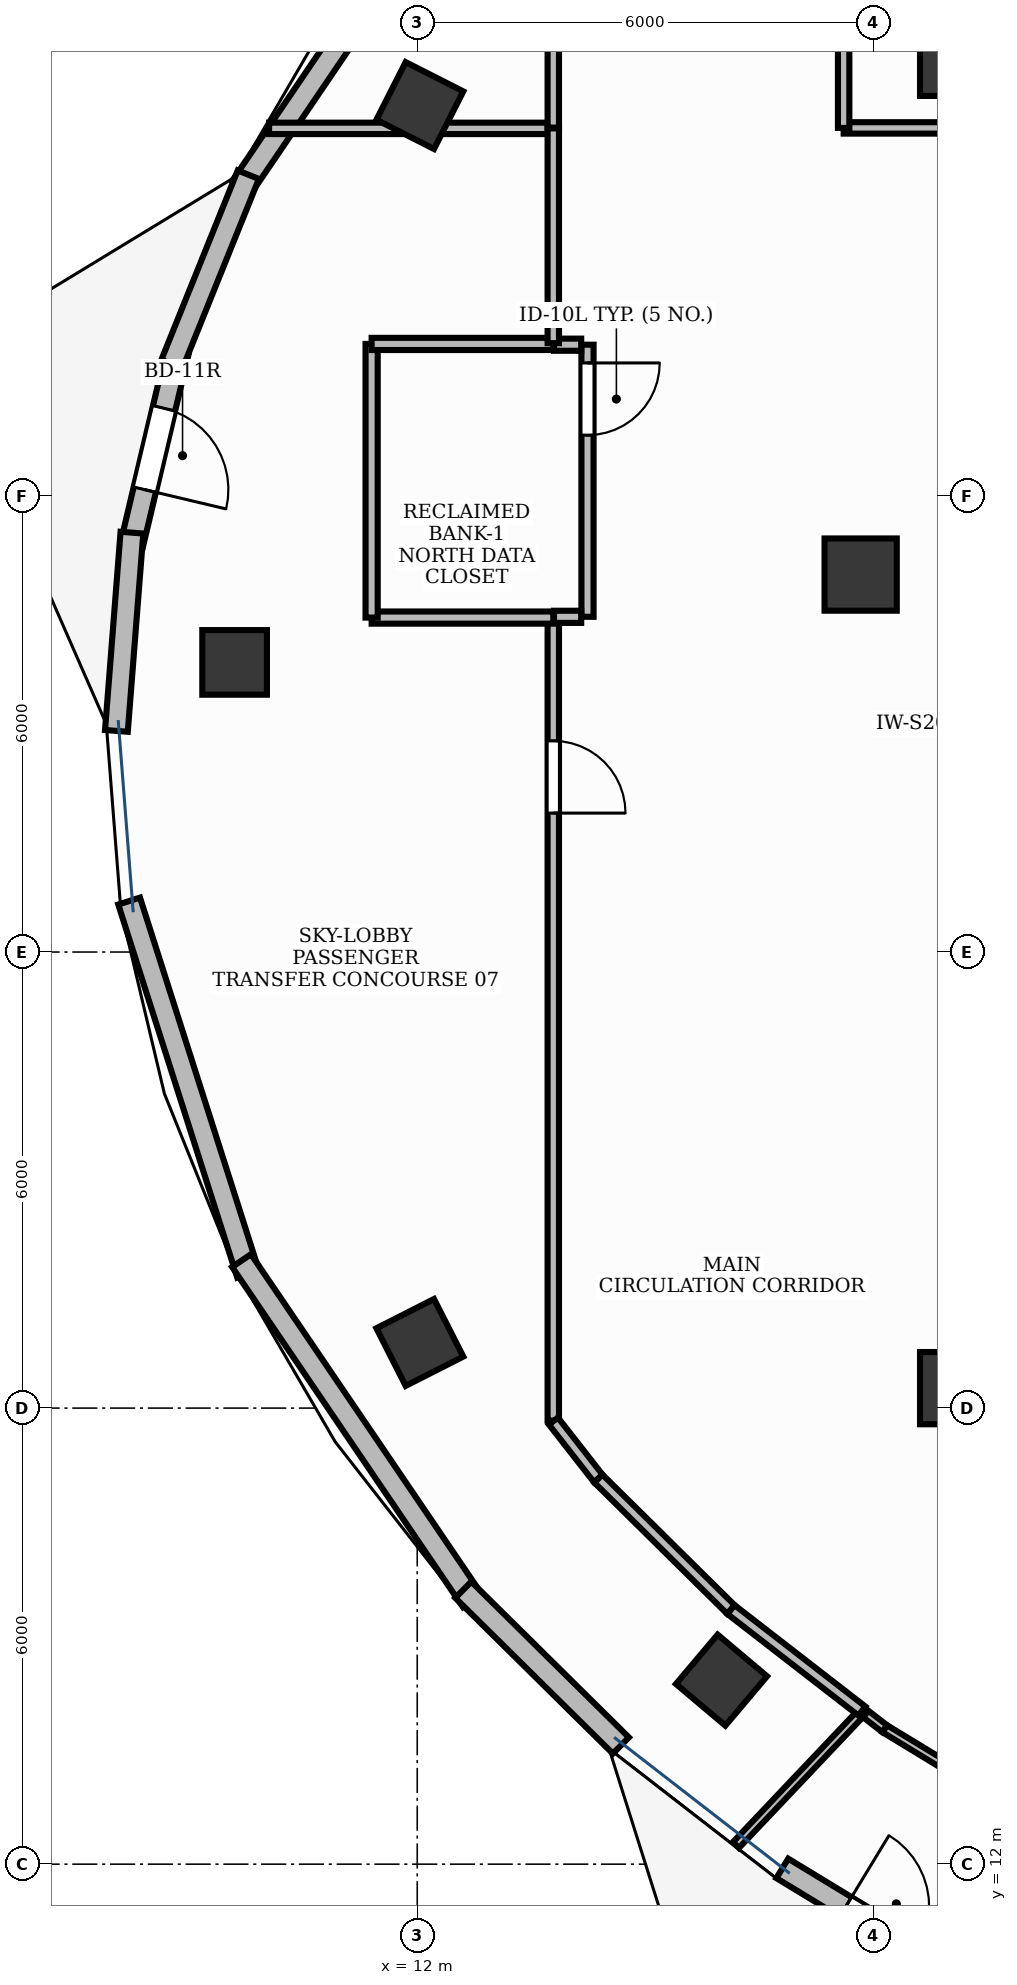
"""IFC4 building model, lengths in metres.
Left out: names, types, materials, properties, quantities, classifications, styles, units other than length and angle.
Written with IfcOpenShell. Run it as: python <this file> out.ifc"""

import sys

from ifc_helpers import new_model, si_unit, direction, frame, frame_2d, origin, origin_2d, place, context, subcontext, project, spatial, rectangle, extrude, element, fill, save


model = new_model("IFC4")
c1 = context("Model", 3, precision=1e-05, world=origin(), true_north=direction((0.0, 1.0)))
c2 = subcontext(c1, "Body", "Model", "MODEL_VIEW")
j1 = project(units=[si_unit("LENGTHUNIT", "METRE"), si_unit("PLANEANGLEUNIT", "RADIAN")], contexts=[c1])
p1 = place(None, origin())
s1 = spatial("IfcSite", under=j1, at=p1, CompositionType="ELEMENT")
p2 = place(p1, origin())
s2 = spatial("IfcBuilding", under=s1, at=p2, CompositionType="ELEMENT")
p3 = place(p2, frame((0.0, 0.0, 273.0)))
s3 = spatial("IfcBuildingStorey", under=s2, at=p3, CompositionType="ELEMENT", Elevation=273.0)
p4 = place(p3, frame((12.034, 35.136, -0.0), z_axis=(0.0, 0.0, 1.0), x_axis=(0.453057191132, 0.891481453292, 0.0)))
e1 = element("IfcColumn", 1, at=p4, inside=s3, PredefinedType="COLUMN", context=c2, shape_type="SweptSolid", body=[
    extrude(rectangle(XDim=0.85, YDim=0.85, at=origin_2d()), origin(), (0.0, 0.0, 1.0), 3.881),
])
p5 = place(p3, frame((19.09, 35.738, -0.0), z_axis=(0.0, 0.0, 1.0), x_axis=(1.0, 0.0, 0.0)))
e2 = element("IfcColumn", 2, at=p5, inside=s3, PredefinedType="COLUMN", context=c2, shape_type="SweptSolid", body=[
    extrude(rectangle(XDim=0.95, YDim=0.95, at=origin_2d()), origin(), (0.0, 0.0, 1.0), 3.881),
])
p6 = place(p3, frame((9.597, 27.81, -0.0), z_axis=(0.0, 0.0, 1.0), x_axis=(0.0, 1.0, 0.0)))
e3 = element("IfcColumn", 3, at=p6, inside=s3, PredefinedType="COLUMN", context=c2, shape_type="SweptSolid", body=[
    extrude(rectangle(XDim=0.85, YDim=0.85, at=origin_2d()), origin(), (0.0, 0.0, 1.0), 3.881),
])
p7 = place(p3, frame((17.834, 28.966, -0.0), z_axis=(0.0, 0.0, 1.0), x_axis=(1.0, 0.0, 0.0)))
e4 = element("IfcColumn", 4, at=p7, inside=s3, PredefinedType="COLUMN", context=c2, shape_type="SweptSolid", body=[
    extrude(rectangle(XDim=0.95, YDim=0.95, at=origin_2d()), origin(), (0.0, 0.0, 1.0), 3.881),
])
p8 = place(p3, frame((12.034, 18.864, -0.0), z_axis=(0.0, 0.0, 1.0), x_axis=(-0.453057191132, 0.891481453292, 0.0)))
e5 = element("IfcColumn", 5, at=p8, inside=s3, PredefinedType="COLUMN", context=c2, shape_type="SweptSolid", body=[
    extrude(rectangle(XDim=0.85, YDim=0.85, at=origin_2d()), origin(), (0.0, 0.0, 1.0), 3.881),
])
p9 = place(p3, frame((19.09, 18.262, -0.0), z_axis=(0.0, 0.0, 1.0), x_axis=(1.0, 0.0, 0.0)))
e6 = element("IfcColumn", 6, at=p9, inside=s3, PredefinedType="COLUMN", context=c2, shape_type="SweptSolid", body=[
    extrude(rectangle(XDim=0.95, YDim=0.95, at=origin_2d()), origin(), (0.0, 0.0, 1.0), 3.881),
])
p10 = place(p3, frame((16.003, 14.421, -0.0), z_axis=(0.0, 0.0, 1.0), x_axis=(-0.764246456939, 0.644924300253, 0.0)))
e7 = element("IfcColumn", 7, at=p10, inside=s3, PredefinedType="COLUMN", context=c2, shape_type="SweptSolid", body=[
    extrude(rectangle(XDim=0.85, YDim=0.85, at=origin_2d()), origin(), (0.0, 0.0, 1.0), 3.881),
])
p11 = place(p3, frame((8.843, 31.883, 0.0), z_axis=(0.0, 0.0, 1.0), x_axis=(-0.230698003521, -0.973025401093, 0.0)))
e8 = element("IfcWall", 8, at=p11, inside=s3, PredefinedType="STANDARD", context=c2, shape_type="SweptSolid", body=[
    extrude(rectangle(XDim=2.6, YDim=0.3, at=frame_2d((1.3, 0.0))), origin(), (0.0, 0.0, 1.0), 3.88),
])
p12 = place(p11, frame((0.75, 0.0, 0.0)))
e9 = element("IfcOpeningElement", 9, at=p12, cuts=e8, PredefinedType="OPENING", context=c2, shape_type="SweptSolid", body=[
    extrude(rectangle(XDim=1.1, YDim=2.15, at=frame_2d((0.55, 1.075))), frame((0.0, 0.165, 0.0), z_axis=(0.0, -1.0, 0.0), x_axis=(1.0, 0.0, 0.0)), (0.0, 0.0, 1.0), 0.33),
])
p13 = place(p3, frame((16.803, 11.945, 0.0), z_axis=(0.0, 0.0, 1.0), x_axis=(0.854482916714, -0.519479494344, 0.0)))
e10 = element("IfcWall", 10, at=p13, inside=s3, PredefinedType="STANDARD", context=c2, shape_type="SweptSolid", body=[
    extrude(rectangle(XDim=3.049, YDim=0.3, at=frame_2d((1.524, 0.0))), origin(), (0.0, 0.0, 1.0), 3.88),
])
p14 = place(p13, frame((0.975, 0.0, 0.0)))
e11 = element("IfcOpeningElement", 11, at=p14, cuts=e10, PredefinedType="OPENING", context=c2, shape_type="SweptSolid", body=[
    extrude(rectangle(XDim=1.1, YDim=2.15, at=frame_2d((0.55, 1.075))), frame((0.0, 0.165, 0.0), z_axis=(0.0, -1.0, 0.0), x_axis=(1.0, 0.0, 0.0)), (0.0, 0.0, 1.0), 0.33),
])
p15 = place(p3, frame((12.725, 38.534, 0.0), z_axis=(0.0, 0.0, 1.0), x_axis=(-0.561547791281, -0.827444305139, 0.0)))
e12 = element("IfcWall", 12, at=p15, inside=s3, PredefinedType="STANDARD", context=c2, shape_type="SweptSolid", body=[
    extrude(rectangle(XDim=5.407, YDim=0.3, at=frame_2d((2.704, 0.0))), origin(), (0.0, 0.0, 1.0), 3.88),
])
p16 = place(p3, frame((9.778, 34.227, 0.0), z_axis=(0.0, 0.0, 1.0), x_axis=(-0.373974639596, -0.927438930032, 0.0)))
e13 = element("IfcWall", 13, at=p16, inside=s3, PredefinedType="STANDARD", context=c2, shape_type="SweptSolid", body=[
    extrude(rectangle(XDim=2.686, YDim=0.3, at=frame_2d((1.343, 0.0))), origin(), (0.0, 0.0, 1.0), 3.88),
])
p17 = place(p3, frame((8.247, 29.517, 0.0), z_axis=(0.0, 0.0, 1.0), x_axis=(-0.078109406708, -0.996944793147, 0.0)))
e14 = element("IfcWall", 14, at=p17, inside=s3, PredefinedType="STANDARD", context=c2, shape_type="SweptSolid", body=[
    extrude(rectangle(XDim=2.616, YDim=0.3, at=frame_2d((1.308, 0.0))), origin(), (0.0, 0.0, 1.0), 3.88),
])
p18 = place(p3, frame((8.21, 24.67, 0.0), z_axis=(0.0, 0.0, 1.0), x_axis=(0.303876387353, -0.952711467974, 0.0)))
e15 = element("IfcWall", 15, at=p18, inside=s3, PredefinedType="STANDARD", context=c2, shape_type="SweptSolid", body=[
    extrude(rectangle(XDim=5.152, YDim=0.3, at=frame_2d((2.576, 0.0))), origin(), (0.0, 0.0, 1.0), 3.88),
])
p19 = place(p3, frame((9.689, 19.94, 0.0), z_axis=(0.0, 0.0, 1.0), x_axis=(0.561547791281, -0.827444305139, 0.0)))
e16 = element("IfcWall", 16, at=p19, inside=s3, PredefinedType="STANDARD", context=c2, shape_type="SweptSolid", body=[
    extrude(rectangle(XDim=5.407, YDim=0.3, at=frame_2d((2.704, 0.0))), origin(), (0.0, 0.0, 1.0), 3.88),
])
p20 = place(p3, frame((12.606, 15.61, 0.0), z_axis=(0.0, 0.0, 1.0), x_axis=(0.711366092533, -0.702821657602, 0.0)))
e17 = element("IfcWall", 17, at=p20, inside=s3, PredefinedType="STANDARD", context=c2, shape_type="SweptSolid", body=[
    extrude(rectangle(XDim=2.915, YDim=0.3, at=frame_2d((1.457, 0.0))), origin(), (0.0, 0.0, 1.0), 3.88),
])
p21 = place(p3, frame((14.24, 31.99, 0.0), z_axis=(0.0, 0.0, 1.0), x_axis=(0.0, -1.0, 0.0)))
e18 = element("IfcWall", 18, at=p21, inside=s3, PredefinedType="PARTITIONING", context=c2, shape_type="SweptSolid", body=[
    extrude(rectangle(XDim=3.58, YDim=0.16, at=frame_2d((1.79, 0.0))), origin(), (0.0, 0.0, 1.0), 2.89),
])
p22 = place(p21, frame((0.24, 0.0, 0.0)))
e19 = element("IfcOpeningElement", 19, at=p22, cuts=e18, PredefinedType="OPENING", context=c2, shape_type="SweptSolid", body=[
    extrude(rectangle(XDim=0.95, YDim=2.15, at=frame_2d((0.475, 1.075))), frame((0.0, 0.095, 0.0), z_axis=(0.0, -1.0, 0.0), x_axis=(1.0, 0.0, 0.0)), (0.0, 0.0, 1.0), 0.19),
])
p23 = place(p3, frame((13.79, 28.39, 0.0), z_axis=(0.0, 0.0, 1.0), x_axis=(0.0, -1.0, 0.0)))
e20 = element("IfcWall", 20, at=p23, inside=s3, PredefinedType="PARTITIONING", context=c2, shape_type="SweptSolid", body=[
    extrude(rectangle(XDim=10.555, YDim=0.15, at=frame_2d((5.277, 0.0))), origin(), (0.0, 0.0, 1.0), 2.89),
])
p24 = place(p23, frame((1.612, 0.0, 0.0)))
e21 = element("IfcOpeningElement", 21, at=p24, cuts=e20, PredefinedType="OPENING", context=c2, shape_type="SweptSolid", body=[
    extrude(rectangle(XDim=0.95, YDim=2.15, at=frame_2d((0.475, 1.075))), frame((0.0, 0.09, 0.0), z_axis=(0.0, -1.0, 0.0), x_axis=(1.0, 0.0, 0.0)), (0.0, 0.0, 1.0), 0.18),
])
for number, where, z_axis, x_axis in (
    (22, (13.8, 31.99, 0.0), (0.0, 0.0, 1.0), (1.0, 0.0, 0.0)),
    (23, (14.157, 28.41, 0.0), (0.0, 0.0, 1.0), (-1.0, 0.0, 0.0)),
):
    element("IfcWall", number, at=place(p3, frame(where, z_axis=z_axis, x_axis=x_axis)), inside=s3, PredefinedType="PARTITIONING", context=c2, shape_type="SweptSolid", body=[
        extrude(rectangle(XDim=0.357, YDim=0.16, at=frame_2d((0.178, 0.0))), origin(), (0.0, 0.0, 1.0), 2.89),
    ])
p25 = place(p3, frame((13.79, 28.4, 0.0), z_axis=(0.0, 0.0, 1.0), x_axis=(-1.0, 0.0, 0.0)))
e24 = element("IfcWall", 24, at=p25, inside=s3, PredefinedType="PARTITIONING", context=c2, shape_type="SweptSolid", body=[
    extrude(rectangle(XDim=2.39, YDim=0.16, at=frame_2d((1.195, 0.0))), origin(), (0.0, 0.0, 1.0), 2.89),
])
p26 = place(p3, frame((11.4, 28.4, 0.0), z_axis=(0.0, 0.0, 1.0), x_axis=(0.0, 1.0, 0.0)))
e25 = element("IfcWall", 25, at=p26, inside=s3, PredefinedType="PARTITIONING", context=c2, shape_type="SweptSolid", body=[
    extrude(rectangle(XDim=3.6, YDim=0.16, at=frame_2d((1.8, 0.0))), origin(), (0.0, 0.0, 1.0), 2.89),
])
p27 = place(p3, frame((11.4, 32.0, 0.0), z_axis=(0.0, 0.0, 1.0), x_axis=(1.0, 0.0, 0.0)))
e26 = element("IfcWall", 26, at=p27, inside=s3, PredefinedType="PARTITIONING", context=c2, shape_type="SweptSolid", body=[
    extrude(rectangle(XDim=2.39, YDim=0.16, at=frame_2d((1.195, 0.0))), origin(), (0.0, 0.0, 1.0), 2.89),
])
p28 = place(p3, frame((17.858, 14.009, 0.0), z_axis=(0.0, 0.0, 1.0), x_axis=(0.790486870827, -0.612478984986, 0.0)))
e27 = element("IfcWall", 27, at=p28, inside=s3, PredefinedType="MOVABLE", context=c2, shape_type="SweptSolid", body=[
    extrude(rectangle(XDim=0.37, YDim=0.11, at=frame_2d((0.185, 0.0))), origin(), (0.0, 0.0, 1.0), 2.89),
])
p29 = place(p3, frame((18.151, 13.781, 0.0), z_axis=(0.0, 0.0, 1.0), x_axis=(0.854507101003, -0.519439711935, 0.0)))
e28 = element("IfcWall", 28, at=p29, inside=s3, PredefinedType="MOVABLE", context=c2, shape_type="SweptSolid", body=[
    extrude(rectangle(XDim=2.291, YDim=0.11, at=frame_2d((1.146, 0.0))), origin(), (0.0, 0.0, 1.0), 2.89),
])
p30 = place(p3, frame((16.193, 12.251, 0.0), z_axis=(0.0, 0.0, 1.0), x_axis=(0.687683096997, 0.726010990347, 0.0)))
e29 = element("IfcWall", 29, at=p30, inside=s3, PredefinedType="MOVABLE", context=c2, shape_type="SweptSolid", body=[
    extrude(rectangle(XDim=2.42, YDim=0.11, at=frame_2d((1.21, 0.0))), origin(), (0.0, 0.0, 1.0), 2.89),
])
p31 = place(p3, frame((10.051, 34.836, 0.0), z_axis=(0.0, 0.0, 1.0), x_axis=(1.0, 0.0, 0.0)))
e30 = element("IfcWall", 30, at=p31, inside=s3, PredefinedType="PARTITIONING", context=c2, shape_type="SweptSolid", body=[
    extrude(rectangle(XDim=3.739, YDim=0.15, at=frame_2d((1.87, 0.0))), origin(), (0.0, 0.0, 1.0), 2.89),
])
p32 = place(p3, frame((13.79, 34.836, 0.0), z_axis=(0.0, 0.0, 1.0), x_axis=(0.0, -1.0, 0.0)))
e31 = element("IfcWall", 31, at=p32, inside=s3, PredefinedType="PARTITIONING", context=c2, shape_type="SweptSolid", body=[
    extrude(rectangle(XDim=2.826, YDim=0.15, at=frame_2d((1.413, 0.0))), origin(), (0.0, 0.0, 1.0), 2.89),
])
p33 = place(p3, frame((13.792, 17.829, 0.0), z_axis=(0.0, 0.0, 1.0), x_axis=(0.615841557122, -0.787870025145, 0.0)))
e32 = element("IfcWall", 32, at=p33, inside=s3, PredefinedType="PARTITIONING", context=c2, shape_type="SweptSolid", body=[
    extrude(rectangle(XDim=0.959, YDim=0.15, at=frame_2d((0.48, 0.0))), origin(), (0.0, 0.0, 1.0), 2.89),
])
p34 = place(p3, frame((14.384, 17.073, 0.0), z_axis=(0.0, 0.0, 1.0), x_axis=(0.711327015195, -0.702861207817, 0.0)))
e33 = element("IfcWall", 33, at=p34, inside=s3, PredefinedType="PARTITIONING", context=c2, shape_type="SweptSolid", body=[
    extrude(rectangle(XDim=2.451, YDim=0.15, at=frame_2d((1.226, 0.0))), origin(), (0.0, 0.0, 1.0), 2.89),
])
p35 = place(p3, frame((16.128, 15.349, 0.0), z_axis=(0.0, 0.0, 1.0), x_axis=(0.790443547822, -0.612534895093, 0.0)))
e34 = element("IfcWall", 34, at=p35, inside=s3, PredefinedType="PARTITIONING", context=c2, shape_type="SweptSolid", body=[
    extrude(rectangle(XDim=2.178, YDim=0.15, at=frame_2d((1.089, 0.0))), origin(), (0.0, 0.0, 1.0), 2.89),
])
p36 = place(p3, frame((21.74, 34.842, 0.0), z_axis=(0.0, 0.0, 1.0), x_axis=(-1.0, 0.0, 0.0)))
e35 = element("IfcWall", 35, at=p36, inside=s3, PredefinedType="PARTITIONING", context=c2, shape_type="SweptSolid", body=[
    extrude(rectangle(XDim=4.13, YDim=0.15, at=frame_2d((2.065, 0.0))), origin(), (0.0, 0.0, 1.0), 2.89),
])
p37 = place(p3, frame((17.61, 34.842, 0.0), z_axis=(0.0, 0.0, 1.0), x_axis=(0.0, 1.0, 0.0)))
e36 = element("IfcWall", 36, at=p37, inside=s3, PredefinedType="PARTITIONING", context=c2, shape_type="SweptSolid", body=[
    extrude(rectangle(XDim=2.158, YDim=0.15, at=frame_2d((1.079, 0.0))), origin(), (0.0, 0.0, 1.0), 2.89),
])
p38 = place(p3, frame((13.79, 36.165, 0.0), z_axis=(0.0, 0.0, 1.0), x_axis=(0.0, -1.0, 0.0)))
e37 = element("IfcWall", 37, at=p38, inside=s3, PredefinedType="PARTITIONING", context=c2, shape_type="SweptSolid", body=[
    extrude(rectangle(XDim=1.319, YDim=0.15, at=frame_2d((0.659, 0.0))), origin(), (0.0, 0.0, 1.0), 2.89),
])
p39 = place(p12, origin())
e38 = element("IfcDoor", 38, at=p39, inside=s3, OperationType="SINGLE_SWING_RIGHT", PredefinedType="DOOR", context=c2, shape_type="SweptSolid", body=[
    extrude(rectangle(XDim=1.1, YDim=2.15, at=frame_2d((0.55, 1.075))), frame((0.0, 0.025, 0.0), z_axis=(0.0, -1.0, 0.0), x_axis=(1.0, 0.0, 0.0)), (0.0, 0.0, 1.0), 0.05),
])
fill(e9, e38)
p40 = place(p14, origin())
e39 = element("IfcDoor", 39, at=p40, inside=s3, OperationType="SINGLE_SWING_LEFT", PredefinedType="DOOR", context=c2, shape_type="SweptSolid", body=[
    extrude(rectangle(XDim=1.1, YDim=2.15, at=frame_2d((0.55, 1.075))), frame((0.0, 0.025, 0.0), z_axis=(0.0, -1.0, 0.0), x_axis=(1.0, 0.0, 0.0)), (0.0, 0.0, 1.0), 0.05),
])
fill(e11, e39)
p41 = place(p22, origin())
e40 = element("IfcDoor", 40, at=p41, inside=s3, OperationType="SINGLE_SWING_LEFT", PredefinedType="DOOR", context=c2, shape_type="SweptSolid", body=[
    extrude(rectangle(XDim=0.95, YDim=2.15, at=frame_2d((0.475, 1.075))), frame((0.0, 0.025, 0.0), z_axis=(0.0, -1.0, 0.0), x_axis=(1.0, 0.0, 0.0)), (0.0, 0.0, 1.0), 0.05),
])
fill(e19, e40)
p42 = place(p24, origin())
e41 = element("IfcDoor", 41, at=p42, inside=s3, OperationType="SINGLE_SWING_RIGHT", PredefinedType="DOOR", context=c2, shape_type="SweptSolid", body=[
    extrude(rectangle(XDim=0.95, YDim=2.15, at=frame_2d((0.475, 1.075))), frame((0.0, 0.025, 0.0), z_axis=(0.0, -1.0, 0.0), x_axis=(1.0, 0.0, 0.0)), (0.0, 0.0, 1.0), 0.05),
])
fill(e21, e41)
save(model, sys.argv[1])
